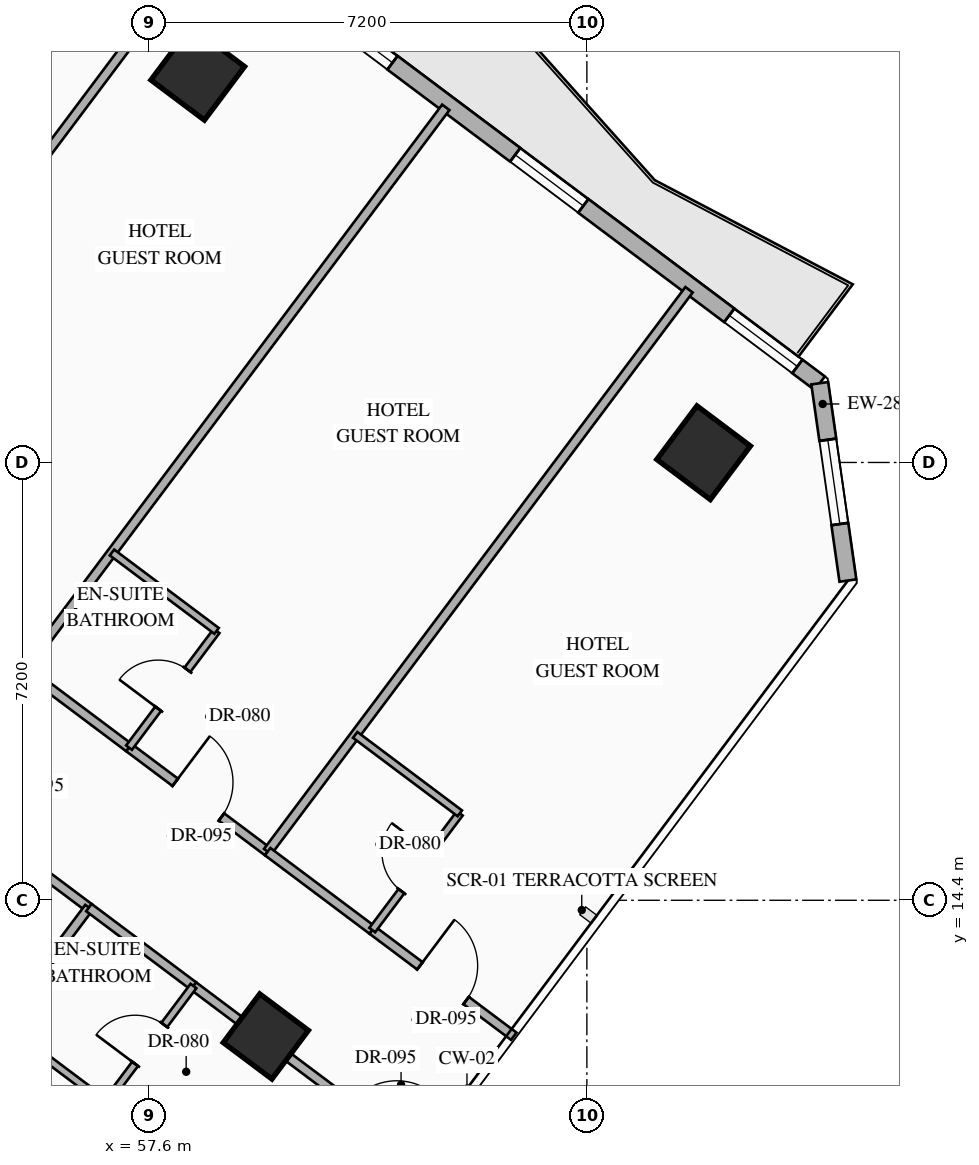
"""IFC4 building model, lengths in metres.
Left out: names, types, materials, properties, quantities, classifications, styles, units other than length and angle.
Written with IfcOpenShell. Run it as: python <this file> out.ifc"""

import sys

from ifc_helpers import new_model, si_unit, direction, frame, frame_2d, origin, origin_2d, place, context, subcontext, project, spatial, rectangle, hollow_rectangle, extrude, element, fill, save


model = new_model("IFC4")
c1 = context("Model", 3, precision=1e-05, world=origin(), true_north=direction((0.0, 1.0)))
c2 = subcontext(c1, "Body", "Model", "MODEL_VIEW")
j1 = project(units=[si_unit("LENGTHUNIT", "METRE"), si_unit("PLANEANGLEUNIT", "RADIAN")], contexts=[c1])
p1 = place(None, origin())
s1 = spatial("IfcSite", under=j1, at=p1, CompositionType="ELEMENT")
p2 = place(p1, origin())
s2 = spatial("IfcBuilding", under=s1, at=p2, CompositionType="ELEMENT")
p3 = place(p2, frame((0.0, 0.0, 50.0)))
s3 = spatial("IfcBuildingStorey", under=s2, at=p3, CompositionType="ELEMENT", Elevation=50.0)
for number, where, z_axis, x_axis in (
    (1, (58.4, 28.0, 0.0), (0.0, 0.0, 1.0), (0.8, -0.6, 0.0)),
    (2, (66.72, 21.76, 0.0), (0.0, 0.0, 1.0), (0.8, -0.6, 0.0)),
):
    element("IfcColumn", number, at=place(p3, frame(where, z_axis=z_axis, x_axis=x_axis)), inside=s3, PredefinedType="COLUMN", context=c2, shape_type="SweptSolid", body=[
        extrude(hollow_rectangle(XDim=1.1, YDim=1.1, WallThickness=0.04, at=origin_2d()), origin(), (0.0, 0.0, 1.0), 3.35),
    ])
p4 = place(p3, frame((59.52, 12.16, 0.0), z_axis=(0.0, 0.0, 1.0), x_axis=(0.799999996291, -0.600000004945, 0.0)))
e3 = element("IfcColumn", 3, at=p4, inside=s3, PredefinedType="COLUMN", context=c2, shape_type="SweptSolid", body=[
    extrude(hollow_rectangle(XDim=1.0, YDim=1.0, WallThickness=0.038, at=origin_2d()), origin(), (0.0, 0.0, 1.0), 3.35),
])
p5 = place(p3, frame((44.86, 40.73, 0.0), z_axis=(0.0, 0.0, 1.0), x_axis=(0.800006902154, -0.599990797017, 0.0)))
e4 = element("IfcWall", 4, at=p5, inside=s3, PredefinedType="STANDARD", context=c2, shape_type="SweptSolid", body=[
    extrude(rectangle(XDim=29.712, YDim=0.28, at=frame_2d((14.856, 0.0))), origin(), (0.0, 0.0, 1.0), 3.13),
])
p6 = place(p5, frame((14.249, 0.0, 0.0)))
e5 = element("IfcOpeningElement", 5, at=p6, cuts=e4, PredefinedType="OPENING", context=c2, shape_type="SweptSolid", body=[
    extrude(rectangle(XDim=1.1, YDim=2.2, at=frame_2d((0.55, 1.1))), frame((0.0, 0.15, 0.0), z_axis=(0.0, -1.0, 0.0), x_axis=(1.0, 0.0, 0.0)), (0.0, 0.0, 1.0), 0.3),
])
p7 = place(p5, frame((1.612, 0.0, 0.85)))
e6 = element("IfcOpeningElement", 6, at=p7, cuts=e4, PredefinedType="OPENING", context=c2, shape_type="SweptSolid", body=[
    extrude(rectangle(XDim=1.4, YDim=1.8, at=frame_2d((0.7, 0.9))), frame((0.0, 0.15, 0.0), z_axis=(0.0, -1.0, 0.0), x_axis=(1.0, 0.0, 0.0)), (0.0, 0.0, 1.0), 0.3),
])
p8 = place(p5, frame((5.667, 0.0, 0.85)))
e7 = element("IfcOpeningElement", 7, at=p8, cuts=e4, PredefinedType="OPENING", context=c2, shape_type="SweptSolid", body=[
    extrude(rectangle(XDim=1.4, YDim=1.8, at=frame_2d((0.7, 0.9))), frame((0.0, 0.15, 0.0), z_axis=(0.0, -1.0, 0.0), x_axis=(1.0, 0.0, 0.0)), (0.0, 0.0, 1.0), 0.3),
])
p9 = place(p5, frame((9.912, 0.0, 0.85)))
e8 = element("IfcOpeningElement", 8, at=p9, cuts=e4, PredefinedType="OPENING", context=c2, shape_type="SweptSolid", body=[
    extrude(rectangle(XDim=1.4, YDim=1.8, at=frame_2d((0.7, 0.9))), frame((0.0, 0.15, 0.0), z_axis=(0.0, -1.0, 0.0), x_axis=(1.0, 0.0, 0.0)), (0.0, 0.0, 1.0), 0.3),
])
p10 = place(p5, frame((19.528, 0.0, 0.85)))
e9 = element("IfcOpeningElement", 9, at=p10, cuts=e4, PredefinedType="OPENING", context=c2, shape_type="SweptSolid", body=[
    extrude(rectangle(XDim=1.4, YDim=1.8, at=frame_2d((0.7, 0.9))), frame((0.0, 0.15, 0.0), z_axis=(0.0, -1.0, 0.0), x_axis=(1.0, 0.0, 0.0)), (0.0, 0.0, 1.0), 0.3),
])
p11 = place(p5, frame((23.451, 0.0, 0.85)))
e10 = element("IfcOpeningElement", 10, at=p11, cuts=e4, PredefinedType="OPENING", context=c2, shape_type="SweptSolid", body=[
    extrude(rectangle(XDim=1.4, YDim=1.8, at=frame_2d((0.7, 0.9))), frame((0.0, 0.15, 0.0), z_axis=(0.0, -1.0, 0.0), x_axis=(1.0, 0.0, 0.0)), (0.0, 0.0, 1.0), 0.3),
])
p12 = place(p5, frame((27.852, 0.0, 0.85)))
e11 = element("IfcOpeningElement", 11, at=p12, cuts=e4, PredefinedType="OPENING", context=c2, shape_type="SweptSolid", body=[
    extrude(rectangle(XDim=1.4, YDim=1.8, at=frame_2d((0.7, 0.9))), frame((0.0, 0.15, 0.0), z_axis=(0.0, -1.0, 0.0), x_axis=(1.0, 0.0, 0.0)), (0.0, 0.0, 1.0), 0.3),
])
p13 = place(p3, frame((68.63, 22.903, 0.0), z_axis=(0.0, 0.0, 1.0), x_axis=(0.141285803956, -0.989968848803, 0.0)))
e12 = element("IfcWall", 12, at=p13, inside=s3, PredefinedType="STANDARD", context=c2, shape_type="SweptSolid", body=[
    extrude(rectangle(XDim=3.278, YDim=0.28, at=frame_2d((1.639, 0.0))), origin(), (0.0, 0.0, 1.0), 3.13),
])
p14 = place(p13, frame((0.939, 0.0, 0.85)))
e13 = element("IfcOpeningElement", 13, at=p14, cuts=e12, PredefinedType="OPENING", context=c2, shape_type="SweptSolid", body=[
    extrude(rectangle(XDim=1.4, YDim=1.8, at=frame_2d((0.7, 0.9))), frame((0.0, 0.15, 0.0), z_axis=(0.0, -1.0, 0.0), x_axis=(1.0, 0.0, 0.0)), (0.0, 0.0, 1.0), 0.3),
])
for number, where, z_axis, x_axis in (
    (14, (51.71, 21.08, 0.0), (0.0, 0.0, 1.0), (0.6, 0.8, 0.0)),
    (15, (55.55, 18.2, 0.0), (0.0, 0.0, 1.0), (0.6, 0.8, 0.0)),
):
    element("IfcWall", number, at=place(p3, frame(where, z_axis=z_axis, x_axis=x_axis)), inside=s3, PredefinedType="PARTITIONING", context=c2, shape_type="SweptSolid", body=[
        extrude(rectangle(XDim=11.55, YDim=0.15, at=frame_2d((5.775, 0.0))), origin(), (0.0, 0.0, 1.0), 3.13),
    ])
p15 = place(p3, frame((55.55, 18.2, 0.0), z_axis=(0.0, 0.0, 1.0), x_axis=(0.79998637334, -0.60001816845, 0.0)))
e16 = element("IfcWall", 16, at=p15, inside=s3, PredefinedType="PARTITIONING", context=c2, shape_type="SweptSolid", body=[
    extrude(rectangle(XDim=2.15, YDim=0.15, at=frame_2d((1.075, 0.0))), origin(), (0.0, 0.0, 1.0), 2.775),
])
p16 = place(p3, frame((57.27, 16.91, 0.0), z_axis=(0.0, 0.0, 1.0), x_axis=(0.800010279488, -0.599986293772, 0.0)))
e17 = element("IfcWall", 17, at=p16, inside=s3, PredefinedType="PARTITIONING", context=c2, shape_type="SweptSolid", body=[
    extrude(rectangle(XDim=2.85, YDim=0.15, at=frame_2d((1.425, 0.0))), origin(), (0.0, 0.0, 1.0), 2.775),
])
p17 = place(p16, frame((0.95, 0.0, 0.0)))
e18 = element("IfcOpeningElement", 18, at=p17, cuts=e17, PredefinedType="OPENING", context=c2, shape_type="SweptSolid", body=[
    extrude(rectangle(XDim=0.95, YDim=2.15, at=frame_2d((0.475, 1.075))), frame((0.0, 0.085, 0.0), z_axis=(0.0, -1.0, 0.0), x_axis=(1.0, 0.0, 0.0)), (0.0, 0.0, 1.0), 0.17),
])
p18 = place(p3, frame((57.27, 16.91, 0.0), z_axis=(0.0, 0.0, 1.0), x_axis=(0.599951172744, 0.800036618114, 0.0)))
e19 = element("IfcWall", 19, at=p18, inside=s3, PredefinedType="PARTITIONING", context=c2, shape_type="SweptSolid", body=[
    extrude(rectangle(XDim=2.4, YDim=0.12, at=frame_2d((1.2, 0.0))), origin(), (0.0, 0.0, 1.0), 3.13),
])
p19 = place(p18, frame((0.8, 0.0, 0.0)))
e20 = element("IfcOpeningElement", 20, at=p19, cuts=e19, PredefinedType="OPENING", context=c2, shape_type="SweptSolid", body=[
    extrude(rectangle(XDim=0.8, YDim=2.06, at=frame_2d((0.4, 1.03))), frame((0.0, 0.07, 0.0), z_axis=(0.0, -1.0, 0.0), x_axis=(1.0, 0.0, 0.0)), (0.0, 0.0, 1.0), 0.14),
])
p20 = place(p3, frame((56.99, 20.12, 0.0), z_axis=(0.0, 0.0, 1.0), x_axis=(0.79998637334, -0.60001816845, 0.0)))
e21 = element("IfcWall", 21, at=p20, inside=s3, PredefinedType="PARTITIONING", context=c2, shape_type="SweptSolid", body=[
    extrude(rectangle(XDim=2.15, YDim=0.12, at=frame_2d((1.075, 0.0))), origin(), (0.0, 0.0, 1.0), 3.13),
])
p21 = place(p3, frame((59.55, 15.2, 0.0), z_axis=(0.0, 0.0, 1.0), x_axis=(0.599996617946, 0.80000253653, 0.0)))
e22 = element("IfcWall", 22, at=p21, inside=s3, PredefinedType="PARTITIONING", context=c2, shape_type="SweptSolid", body=[
    extrude(rectangle(XDim=11.55, YDim=0.15, at=frame_2d((5.775, 0.0))), origin(), (0.0, 0.0, 1.0), 3.13),
])
p22 = place(p3, frame((59.55, 15.2, 0.0), z_axis=(0.0, 0.0, 1.0), x_axis=(0.79998637334, -0.60001816845, 0.0)))
e23 = element("IfcWall", 23, at=p22, inside=s3, PredefinedType="PARTITIONING", context=c2, shape_type="SweptSolid", body=[
    extrude(rectangle(XDim=2.15, YDim=0.15, at=frame_2d((1.075, 0.0))), origin(), (0.0, 0.0, 1.0), 2.775),
])
p23 = place(p3, frame((61.27, 13.91, 0.0), z_axis=(0.0, 0.0, 1.0), x_axis=(0.800010068184, -0.59998657552, 0.0)))
e24 = element("IfcWall", 24, at=p23, inside=s3, PredefinedType="PARTITIONING", context=c2, shape_type="SweptSolid", body=[
    extrude(rectangle(XDim=2.91, YDim=0.15, at=frame_2d((1.455, 0.0))), origin(), (0.0, 0.0, 1.0), 3.13),
])
p24 = place(p23, frame((0.98, 0.0, 0.0)))
e25 = element("IfcOpeningElement", 25, at=p24, cuts=e24, PredefinedType="OPENING", context=c2, shape_type="SweptSolid", body=[
    extrude(rectangle(XDim=0.95, YDim=2.15, at=frame_2d((0.475, 1.075))), frame((0.0, 0.085, 0.0), z_axis=(0.0, -1.0, 0.0), x_axis=(1.0, 0.0, 0.0)), (0.0, 0.0, 1.0), 0.17),
])
p25 = place(p3, frame((61.27, 13.91, 0.0), z_axis=(0.0, 0.0, 1.0), x_axis=(0.599951172744, 0.800036618114, 0.0)))
e26 = element("IfcWall", 26, at=p25, inside=s3, PredefinedType="PARTITIONING", context=c2, shape_type="SweptSolid", body=[
    extrude(rectangle(XDim=2.4, YDim=0.12, at=frame_2d((1.2, 0.0))), origin(), (0.0, 0.0, 1.0), 3.13),
])
p26 = place(p25, frame((0.8, 0.0, 0.0)))
e27 = element("IfcOpeningElement", 27, at=p26, cuts=e26, PredefinedType="OPENING", context=c2, shape_type="SweptSolid", body=[
    extrude(rectangle(XDim=0.8, YDim=2.06, at=frame_2d((0.4, 1.03))), frame((0.0, 0.07, 0.0), z_axis=(0.0, -1.0, 0.0), x_axis=(1.0, 0.0, 0.0)), (0.0, 0.0, 1.0), 0.14),
])
p27 = place(p3, frame((60.99, 17.12, 0.0), z_axis=(0.0, 0.0, 1.0), x_axis=(0.79998637334, -0.60001816845, 0.0)))
e28 = element("IfcWall", 28, at=p27, inside=s3, PredefinedType="PARTITIONING", context=c2, shape_type="SweptSolid", body=[
    extrude(rectangle(XDim=2.15, YDim=0.12, at=frame_2d((1.075, 0.0))), origin(), (0.0, 0.0, 1.0), 3.13),
])
p28 = place(p3, frame((52.89, 17.07, 0.0), z_axis=(0.0, 0.0, 1.0), x_axis=(0.800012600101, -0.599983199498, 0.0)))
e29 = element("IfcWall", 29, at=p28, inside=s3, PredefinedType="PARTITIONING", context=c2, shape_type="SweptSolid", body=[
    extrude(rectangle(XDim=4.65, YDim=0.15, at=frame_2d((2.325, 0.0))), origin(), (0.0, 0.0, 1.0), 2.425),
])
p29 = place(p28, frame((1.85, 0.0, 0.0)))
e30 = element("IfcOpeningElement", 30, at=p29, cuts=e29, PredefinedType="OPENING", context=c2, shape_type="SweptSolid", body=[
    extrude(rectangle(XDim=0.95, YDim=2.15, at=frame_2d((0.475, 1.075))), frame((0.0, 0.085, 0.0), z_axis=(0.0, -1.0, 0.0), x_axis=(1.0, 0.0, 0.0)), (0.0, 0.0, 1.0), 0.17),
])
p30 = place(p3, frame((49.8, 5.2, 0.0), z_axis=(0.0, 0.0, 1.0), x_axis=(0.6, 0.8, 0.0)))
e31 = element("IfcWall", 31, at=p30, inside=s3, PredefinedType="PARTITIONING", context=c2, shape_type="SweptSolid", body=[
    extrude(rectangle(XDim=11.35, YDim=0.15, at=frame_2d((5.675, 0.0))), origin(), (0.0, 0.0, 1.0), 3.13),
])
p31 = place(p3, frame((56.61, 14.28, 0.0), z_axis=(0.0, 0.0, 1.0), x_axis=(0.79998637334, -0.60001816845, 0.0)))
e32 = element("IfcWall", 32, at=p31, inside=s3, PredefinedType="PARTITIONING", context=c2, shape_type="SweptSolid", body=[
    extrude(rectangle(XDim=2.15, YDim=0.15, at=frame_2d((1.075, 0.0))), origin(), (0.0, 0.0, 1.0), 2.425),
])
p32 = place(p3, frame((58.33, 12.99, 0.0), z_axis=(0.0, 0.0, 1.0), x_axis=(0.799993779569, -0.600008293819, 0.0)))
e33 = element("IfcWall", 33, at=p32, inside=s3, PredefinedType="PARTITIONING", context=c2, shape_type="SweptSolid", body=[
    extrude(rectangle(XDim=4.71, YDim=0.15, at=frame_2d((2.355, 0.0))), origin(), (0.0, 0.0, 1.0), 2.425),
])
p33 = place(p32, frame((3.23, 0.0, 0.0)))
e34 = element("IfcOpeningElement", 34, at=p33, cuts=e33, PredefinedType="OPENING", context=c2, shape_type="SweptSolid", body=[
    extrude(rectangle(XDim=0.95, YDim=2.15, at=frame_2d((0.475, 1.075))), frame((0.0, 0.085, 0.0), z_axis=(0.0, -1.0, 0.0), x_axis=(1.0, 0.0, 0.0)), (0.0, 0.0, 1.0), 0.17),
])
p34 = place(p3, frame((56.89, 11.07, 0.0), z_axis=(0.0, 0.0, 1.0), x_axis=(0.600065100855, 0.79995117022, 0.0)))
e35 = element("IfcWall", 35, at=p34, inside=s3, PredefinedType="PARTITIONING", context=c2, shape_type="SweptSolid", body=[
    extrude(rectangle(XDim=2.4, YDim=0.12, at=frame_2d((1.2, 0.0))), origin(), (0.0, 0.0, 1.0), 3.13),
])
p35 = place(p34, frame((0.8, 0.0, 0.0)))
e36 = element("IfcOpeningElement", 36, at=p35, cuts=e35, PredefinedType="OPENING", context=c2, shape_type="SweptSolid", body=[
    extrude(rectangle(XDim=0.8, YDim=2.06, at=frame_2d((0.4, 1.03))), frame((0.0, 0.07, 0.0), z_axis=(0.0, -1.0, 0.0), x_axis=(1.0, 0.0, 0.0)), (0.0, 0.0, 1.0), 0.14),
])
p36 = place(p3, frame((55.17, 12.36, 0.0), z_axis=(0.0, 0.0, 1.0), x_axis=(0.79998637334, -0.60001816845, 0.0)))
e37 = element("IfcWall", 37, at=p36, inside=s3, PredefinedType="PARTITIONING", context=c2, shape_type="SweptSolid", body=[
    extrude(rectangle(XDim=2.15, YDim=0.12, at=frame_2d((1.075, 0.0))), origin(), (0.0, 0.0, 1.0), 3.13),
])
p37 = place(p10, origin())
e38 = element("IfcWindow", 38, at=p37, inside=s3, PartitioningType="SINGLE_PANEL", PredefinedType="WINDOW", context=c2, shape_type="SweptSolid", body=[
    extrude(rectangle(XDim=1.4, YDim=1.8, at=frame_2d((0.7, 0.9))), frame((0.0, 0.03, 0.0), z_axis=(0.0, -1.0, 0.0), x_axis=(1.0, 0.0, 0.0)), (0.0, 0.0, 1.0), 0.06),
])
fill(e9, e38)
p38 = place(p11, origin())
e39 = element("IfcWindow", 39, at=p38, inside=s3, PartitioningType="SINGLE_PANEL", PredefinedType="WINDOW", context=c2, shape_type="SweptSolid", body=[
    extrude(rectangle(XDim=1.4, YDim=1.8, at=frame_2d((0.7, 0.9))), frame((0.0, 0.03, 0.0), z_axis=(0.0, -1.0, 0.0), x_axis=(1.0, 0.0, 0.0)), (0.0, 0.0, 1.0), 0.06),
])
fill(e10, e39)
p39 = place(p12, origin())
e40 = element("IfcWindow", 40, at=p39, inside=s3, PartitioningType="SINGLE_PANEL", PredefinedType="WINDOW", context=c2, shape_type="SweptSolid", body=[
    extrude(rectangle(XDim=1.4, YDim=1.8, at=frame_2d((0.7, 0.9))), frame((0.0, 0.03, 0.0), z_axis=(0.0, -1.0, 0.0), x_axis=(1.0, 0.0, 0.0)), (0.0, 0.0, 1.0), 0.06),
])
fill(e11, e40)
p40 = place(p14, origin())
e41 = element("IfcWindow", 41, at=p40, inside=s3, PartitioningType="SINGLE_PANEL", PredefinedType="WINDOW", context=c2, shape_type="SweptSolid", body=[
    extrude(rectangle(XDim=1.4, YDim=1.8, at=frame_2d((0.7, 0.9))), frame((0.0, 0.03, 0.0), z_axis=(0.0, -1.0, 0.0), x_axis=(1.0, 0.0, 0.0)), (0.0, 0.0, 1.0), 0.06),
])
fill(e13, e41)
p41 = place(p17, origin())
e42 = element("IfcDoor", 42, at=p41, inside=s3, OperationType="SINGLE_SWING_LEFT", PredefinedType="DOOR", context=c2, shape_type="SweptSolid", body=[
    extrude(rectangle(XDim=0.95, YDim=2.15, at=frame_2d((0.475, 1.075))), frame((0.0, 0.025, 0.0), z_axis=(0.0, -1.0, 0.0), x_axis=(1.0, 0.0, 0.0)), (0.0, 0.0, 1.0), 0.05),
])
fill(e18, e42)
p42 = place(p19, origin())
e43 = element("IfcDoor", 43, at=p42, inside=s3, OperationType="SINGLE_SWING_LEFT", PredefinedType="DOOR", context=c2, shape_type="SweptSolid", body=[
    extrude(rectangle(XDim=0.8, YDim=2.06, at=frame_2d((0.4, 1.03))), frame((0.0, 0.025, 0.0), z_axis=(0.0, -1.0, 0.0), x_axis=(1.0, 0.0, 0.0)), (0.0, 0.0, 1.0), 0.05),
])
fill(e20, e43)
p43 = place(p24, origin())
e44 = element("IfcDoor", 44, at=p43, inside=s3, OperationType="SINGLE_SWING_LEFT", PredefinedType="DOOR", context=c2, shape_type="SweptSolid", body=[
    extrude(rectangle(XDim=0.95, YDim=2.15, at=frame_2d((0.475, 1.075))), frame((0.0, 0.025, 0.0), z_axis=(0.0, -1.0, 0.0), x_axis=(1.0, 0.0, 0.0)), (0.0, 0.0, 1.0), 0.05),
])
fill(e25, e44)
p44 = place(p26, origin())
e45 = element("IfcDoor", 45, at=p44, inside=s3, OperationType="SINGLE_SWING_RIGHT", PredefinedType="DOOR", context=c2, shape_type="SweptSolid", body=[
    extrude(rectangle(XDim=0.8, YDim=2.06, at=frame_2d((0.4, 1.03))), frame((0.0, 0.025, 0.0), z_axis=(0.0, -1.0, 0.0), x_axis=(1.0, 0.0, 0.0)), (0.0, 0.0, 1.0), 0.05),
])
fill(e27, e45)
p45 = place(p35, origin())
e46 = element("IfcDoor", 46, at=p45, inside=s3, OperationType="SINGLE_SWING_LEFT", PredefinedType="DOOR", context=c2, shape_type="SweptSolid", body=[
    extrude(rectangle(XDim=0.8, YDim=2.06, at=frame_2d((0.4, 1.03))), frame((0.0, 0.025, 0.0), z_axis=(0.0, -1.0, 0.0), x_axis=(1.0, 0.0, 0.0)), (0.0, 0.0, 1.0), 0.05),
])
fill(e36, e46)
save(model, sys.argv[1])
